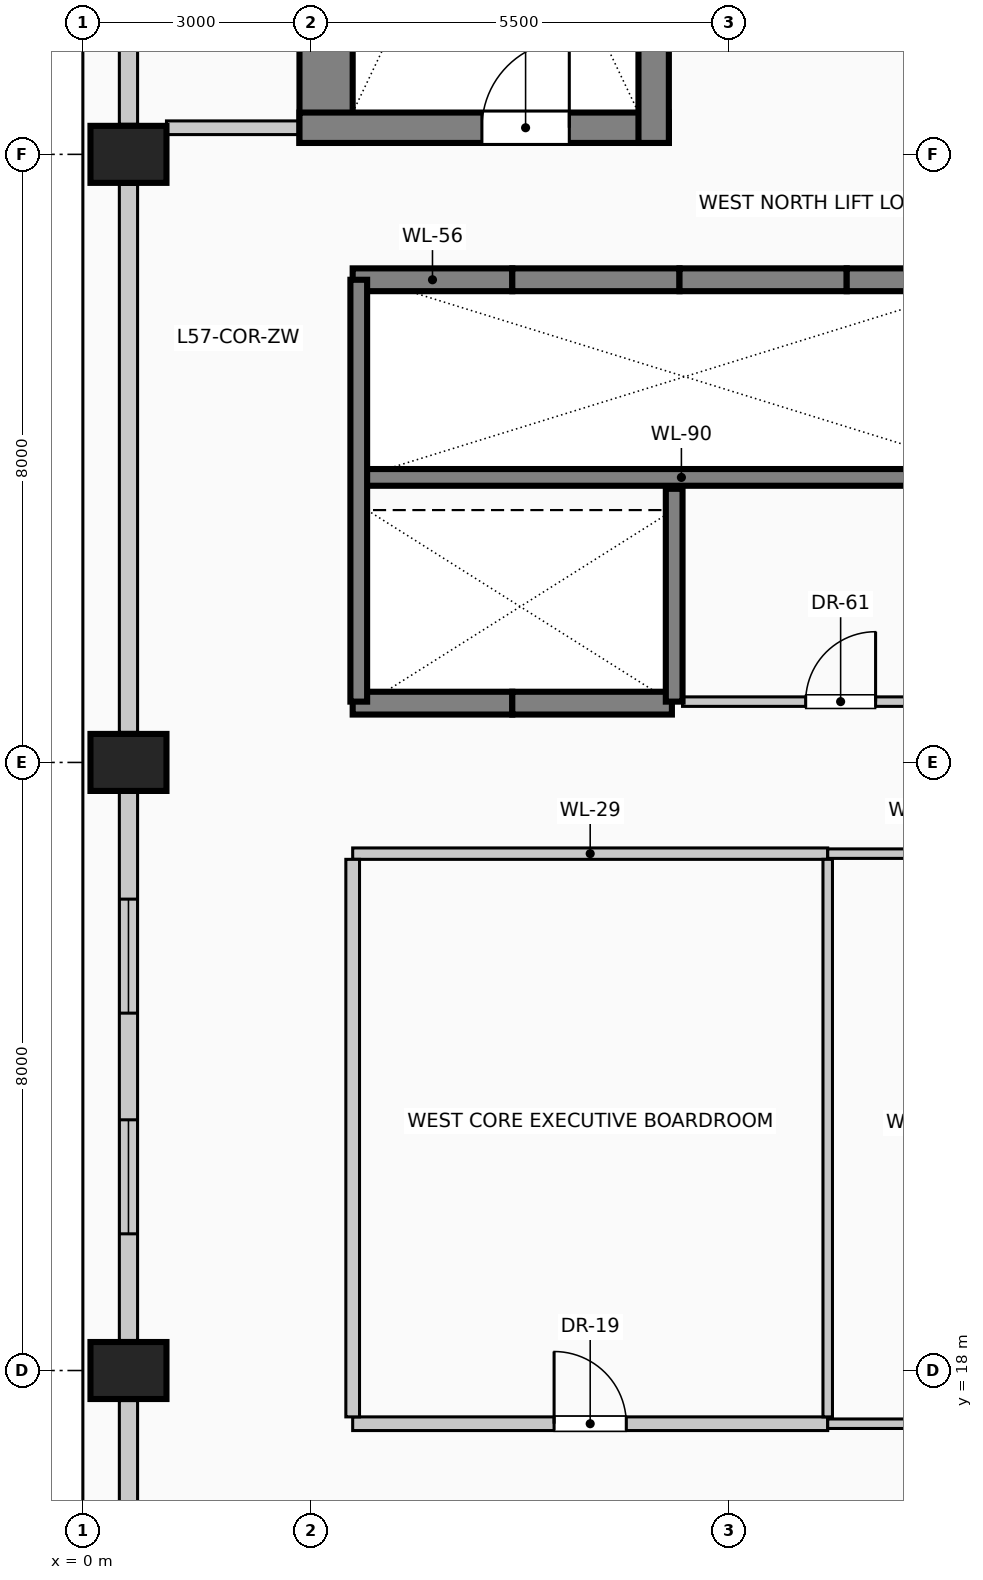
"""IFC4 building model, lengths in metres.
Left out: names, types, materials, properties, quantities, classifications, styles, units other than length and angle.
Written with IfcOpenShell. Run it as: python <this file> out.ifc"""

import sys

from ifc_helpers import new_model, si_unit, direction, frame, frame_2d, origin, origin_2d, place, context, subcontext, project, spatial, rectangle, extrude, element, fill, save


model = new_model("IFC4")
c1 = context("Model", 3, precision=1e-05, world=origin(), true_north=direction((0.0, 1.0)))
c2 = subcontext(c1, "Body", "Model", "MODEL_VIEW")
j1 = project(units=[si_unit("LENGTHUNIT", "METRE"), si_unit("PLANEANGLEUNIT", "RADIAN")], contexts=[c1])
p1 = place(None, origin())
s1 = spatial("IfcSite", under=j1, at=p1, CompositionType="ELEMENT")
p2 = place(p1, origin())
s2 = spatial("IfcBuilding", under=s1, at=p2, CompositionType="ELEMENT")
p3 = place(p2, frame((0.0, 0.0, 234.6)))
s3 = spatial("IfcBuildingStorey", under=s2, at=p3, CompositionType="ELEMENT", Elevation=234.6)
p4 = place(p3, frame((3.2, 34.15, 0.0), z_axis=(0.0, 0.0, 1.0), x_axis=(0.0, 1.0, 0.0)))
e1 = element("IfcWall", 1, at=p4, inside=s3, PredefinedType="SHEAR", context=c2, shape_type="SweptSolid", body=[
    extrude(rectangle(XDim=8.98, YDim=0.7, at=frame_2d((4.49, 0.0))), origin(), (0.0, 0.0, 1.0), 4.0),
])
p5 = place(p3, frame((2.85, 34.35, 0.0), z_axis=(0.0, 0.0, 1.0), x_axis=(1.0, 0.0, 0.0)))
e2 = element("IfcWall", 2, at=p5, inside=s3, PredefinedType="SHEAR", context=c2, shape_type="SweptSolid", body=[
    extrude(rectangle(XDim=4.86, YDim=0.4, at=frame_2d((2.43, 0.0))), origin(), (0.0, 0.0, 1.0), 4.0),
])
p6 = place(p5, frame((2.4, 0.0, 0.0)))
e3 = element("IfcOpeningElement", 3, at=p6, cuts=e2, PredefinedType="OPENING", context=c2, shape_type="SweptSolid", body=[
    extrude(rectangle(XDim=1.15, YDim=2.2, at=frame_2d((0.575, 1.1))), frame((0.0, 0.21, 0.0), z_axis=(0.0, -1.0, 0.0), x_axis=(1.0, 0.0, 0.0)), (0.0, 0.0, 1.0), 0.42),
])
p7 = place(p3, frame((7.51, 34.15, 0.0), z_axis=(0.0, 0.0, 1.0), x_axis=(0.0, 1.0, 0.0)))
e4 = element("IfcWall", 4, at=p7, inside=s3, PredefinedType="SHEAR", context=c2, shape_type="SweptSolid", body=[
    extrude(rectangle(XDim=8.98, YDim=0.4, at=frame_2d((4.49, 0.0))), origin(), (0.0, 0.0, 1.0), 4.0),
])
for number, where, z_axis, x_axis in (
    (5, (0.6, 18.0, 0.0), (0.0, 0.0, 1.0), (0.0, 1.0, 0.0)),
    (6, (0.6, 26.0, 0.0), (0.0, 0.0, 1.0), (0.0, 1.0, 0.0)),
    (7, (0.6, 34.0, 0.0), (0.0, 0.0, 1.0), (0.0, 1.0, 0.0)),
):
    element("IfcColumn", number, at=place(p3, frame(where, z_axis=z_axis, x_axis=x_axis)), inside=s3, PredefinedType="COLUMN", context=c2, shape_type="SweptSolid", body=[
        extrude(rectangle(XDim=0.75, YDim=1.0, at=origin_2d()), origin(), (0.0, 0.0, 1.0), 4.0),
    ])
p8 = place(p3, frame((0.6, 10.395, 0.0), z_axis=(0.0, 0.0, 1.0), x_axis=(0.0, 1.0, 0.0)))
e8 = element("IfcWall", 8, at=p8, inside=s3, PredefinedType="SOLIDWALL", context=c2, shape_type="SweptSolid", body=[
    extrude(rectangle(XDim=7.21, YDim=0.24, at=frame_2d((3.605, 0.0))), origin(), (0.0, 0.0, 1.0), 2.91),
])
p9 = place(p8, frame((1.403, 0.0, 0.42)))
e9 = element("IfcOpeningElement", 9, at=p9, cuts=e8, PredefinedType="OPENING", context=c2, shape_type="SweptSolid", body=[
    extrude(rectangle(XDim=1.5, YDim=2.2, at=frame_2d((0.75, 1.1))), frame((0.0, 0.13, 0.0), z_axis=(0.0, -1.0, 0.0), x_axis=(1.0, 0.0, 0.0)), (0.0, 0.0, 1.0), 0.26),
])
p10 = place(p3, frame((0.6, 18.395, 0.0), z_axis=(0.0, 0.0, 1.0), x_axis=(0.0, 1.0, 0.0)))
e10 = element("IfcWall", 10, at=p10, inside=s3, PredefinedType="SOLIDWALL", context=c2, shape_type="SweptSolid", body=[
    extrude(rectangle(XDim=7.21, YDim=0.24, at=frame_2d((3.605, 0.0))), origin(), (0.0, 0.0, 1.0), 2.91),
])
p11 = place(p10, frame((1.403, 0.0, 0.42)))
e11 = element("IfcOpeningElement", 11, at=p11, cuts=e10, PredefinedType="OPENING", context=c2, shape_type="SweptSolid", body=[
    extrude(rectangle(XDim=1.5, YDim=2.2, at=frame_2d((0.75, 1.1))), frame((0.0, 0.13, 0.0), z_axis=(0.0, -1.0, 0.0), x_axis=(1.0, 0.0, 0.0)), (0.0, 0.0, 1.0), 0.26),
])
p12 = place(p10, frame((4.307, 0.0, 0.42)))
e12 = element("IfcOpeningElement", 12, at=p12, cuts=e10, PredefinedType="OPENING", context=c2, shape_type="SweptSolid", body=[
    extrude(rectangle(XDim=1.5, YDim=2.2, at=frame_2d((0.75, 1.1))), frame((0.0, 0.13, 0.0), z_axis=(0.0, -1.0, 0.0), x_axis=(1.0, 0.0, 0.0)), (0.0, 0.0, 1.0), 0.26),
])
p13 = place(p3, frame((0.6, 26.395, 0.0), z_axis=(0.0, 0.0, 1.0), x_axis=(0.0, 1.0, 0.0)))
e13 = element("IfcWall", 13, at=p13, inside=s3, PredefinedType="SOLIDWALL", context=c2, shape_type="SweptSolid", body=[
    extrude(rectangle(XDim=7.21, YDim=0.24, at=frame_2d((3.605, 0.0))), origin(), (0.0, 0.0, 1.0), 2.91),
])
p14 = place(p3, frame((0.6, 34.395, 0.0), z_axis=(0.0, 0.0, 1.0), x_axis=(0.0, 1.0, 0.0)))
e14 = element("IfcWall", 14, at=p14, inside=s3, PredefinedType="SOLIDWALL", context=c2, shape_type="SweptSolid", body=[
    extrude(rectangle(XDim=7.61, YDim=0.24, at=frame_2d((3.805, 0.0))), origin(), (0.0, 0.0, 1.0), 2.91),
])
p15 = place(p3, frame((3.55, 32.35, 0.0), z_axis=(0.0, 0.0, 1.0), x_axis=(1.0, 0.0, 0.0)))
e15 = element("IfcWall", 15, at=p15, inside=s3, PredefinedType="SOLIDWALL", context=c2, shape_type="SweptSolid", body=[
    extrude(rectangle(XDim=2.1, YDim=0.3, at=frame_2d((1.05, 0.0))), origin(), (0.0, 0.0, 1.0), 4.0),
])
p16 = place(p3, frame((5.65, 32.35, 0.0), z_axis=(0.0, 0.0, 1.0), x_axis=(1.0, 0.0, 0.0)))
e16 = element("IfcWall", 16, at=p16, inside=s3, PredefinedType="SOLIDWALL", context=c2, shape_type="SweptSolid", body=[
    extrude(rectangle(XDim=2.2, YDim=0.3, at=frame_2d((1.1, 0.0))), origin(), (0.0, 0.0, 1.0), 4.0),
])
p17 = place(p3, frame((7.85, 32.35, 0.0), z_axis=(0.0, 0.0, 1.0), x_axis=(1.0, 0.0, 0.0)))
e17 = element("IfcWall", 17, at=p17, inside=s3, PredefinedType="SOLIDWALL", context=c2, shape_type="SweptSolid", body=[
    extrude(rectangle(XDim=2.2, YDim=0.3, at=frame_2d((1.1, 0.0))), origin(), (0.0, 0.0, 1.0), 4.0),
])
p18 = place(p3, frame((10.05, 32.35, 0.0), z_axis=(0.0, 0.0, 1.0), x_axis=(1.0, 0.0, 0.0)))
e18 = element("IfcWall", 18, at=p18, inside=s3, PredefinedType="SOLIDWALL", context=c2, shape_type="SweptSolid", body=[
    extrude(rectangle(XDim=2.15, YDim=0.3, at=frame_2d((1.075, 0.0))), origin(), (0.0, 0.0, 1.0), 4.0),
])
p19 = place(p3, frame((5.65, 26.78, 0.0), z_axis=(0.0, 0.0, 1.0), x_axis=(-1.0, 0.0, 0.0)))
e19 = element("IfcWall", 19, at=p19, inside=s3, PredefinedType="SOLIDWALL", context=c2, shape_type="SweptSolid", body=[
    extrude(rectangle(XDim=2.1, YDim=0.3, at=frame_2d((1.05, 0.0))), origin(), (0.0, 0.0, 1.0), 4.0),
])
p20 = place(p3, frame((7.75, 26.78, 0.0), z_axis=(0.0, 0.0, 1.0), x_axis=(-1.0, 0.0, 0.0)))
e20 = element("IfcWall", 20, at=p20, inside=s3, PredefinedType="SOLIDWALL", context=c2, shape_type="SweptSolid", body=[
    extrude(rectangle(XDim=2.1, YDim=0.3, at=frame_2d((1.05, 0.0))), origin(), (0.0, 0.0, 1.0), 4.0),
])
p21 = place(p3, frame((3.55, 29.75, 0.0), z_axis=(0.0, 0.0, 1.0), x_axis=(1.0, 0.0, 0.0)))
e21 = element("IfcWall", 21, at=p21, inside=s3, PredefinedType="SOLIDWALL", context=c2, shape_type="SweptSolid", body=[
    extrude(rectangle(XDim=8.65, YDim=0.22, at=frame_2d((4.325, 0.0))), origin(), (0.0, 0.0, 1.0), 4.0),
])
p22 = place(p3, frame((3.63, 26.8, 0.0), z_axis=(0.0, 0.0, 1.0), x_axis=(0.0, 1.0, 0.0)))
e22 = element("IfcWall", 22, at=p22, inside=s3, PredefinedType="SOLIDWALL", context=c2, shape_type="SweptSolid", body=[
    extrude(rectangle(XDim=5.55, YDim=0.22, at=frame_2d((2.775, 0.0))), origin(), (0.0, 0.0, 1.0), 4.0),
])
p23 = place(p3, frame((7.78, 26.8, 0.0), z_axis=(0.0, 0.0, 1.0), x_axis=(0.0, 1.0, 0.0)))
e23 = element("IfcWall", 23, at=p23, inside=s3, PredefinedType="SOLIDWALL", context=c2, shape_type="SweptSolid", body=[
    extrude(rectangle(XDim=2.8, YDim=0.22, at=frame_2d((1.4, 0.0))), origin(), (0.0, 0.0, 1.0), 4.0),
])
p24 = place(p3, frame((3.55, 17.3, 0.0), z_axis=(0.0, 0.0, 1.0), x_axis=(1.0, 0.0, 0.0)))
e24 = element("IfcWall", 24, at=p24, inside=s3, PredefinedType="PARTITIONING", context=c2, shape_type="SweptSolid", body=[
    extrude(rectangle(XDim=6.25, YDim=0.18, at=frame_2d((3.125, 0.0))), origin(), (0.0, 0.0, 1.0), 3.66),
])
p25 = place(p24, frame((2.65, 0.0, 0.0)))
e25 = element("IfcOpeningElement", 25, at=p25, cuts=e24, PredefinedType="OPENING", context=c2, shape_type="SweptSolid", body=[
    extrude(rectangle(XDim=0.95, YDim=2.15, at=frame_2d((0.475, 1.075))), frame((0.0, 0.1, 0.0), z_axis=(0.0, -1.0, 0.0), x_axis=(1.0, 0.0, 0.0)), (0.0, 0.0, 1.0), 0.2),
])
p26 = place(p3, frame((9.8, 17.3, 0.0), z_axis=(0.0, 0.0, 1.0), x_axis=(1.0, 0.0, 0.0)))
e26 = element("IfcWall", 26, at=p26, inside=s3, PredefinedType="PARTITIONING", context=c2, shape_type="SweptSolid", body=[
    extrude(rectangle(XDim=6.05, YDim=0.125, at=frame_2d((3.025, 0.0))), origin(), (0.0, 0.0, 1.0), 3.66),
])
p27 = place(p26, frame((2.575, 0.0, 0.0)))
e27 = element("IfcOpeningElement", 27, at=p27, cuts=e26, PredefinedType="OPENING", context=c2, shape_type="SweptSolid", body=[
    extrude(rectangle(XDim=0.9, YDim=2.1, at=frame_2d((0.45, 1.05))), frame((0.0, 0.073, 0.0), z_axis=(0.0, -1.0, 0.0), x_axis=(1.0, 0.0, 0.0)), (0.0, 0.0, 1.0), 0.145),
])
p28 = place(p3, frame((3.55, 24.8, 0.0), z_axis=(0.0, 0.0, 1.0), x_axis=(1.0, 0.0, 0.0)))
e28 = element("IfcWall", 28, at=p28, inside=s3, PredefinedType="PARTITIONING", context=c2, shape_type="SweptSolid", body=[
    extrude(rectangle(XDim=6.25, YDim=0.15, at=frame_2d((3.125, 0.0))), origin(), (0.0, 0.0, 1.0), 3.66),
])
p29 = place(p3, frame((9.8, 24.8, 0.0), z_axis=(0.0, 0.0, 1.0), x_axis=(1.0, 0.0, 0.0)))
e29 = element("IfcWall", 29, at=p29, inside=s3, PredefinedType="PARTITIONING", context=c2, shape_type="SweptSolid", body=[
    extrude(rectangle(XDim=2.4, YDim=0.125, at=frame_2d((1.2, 0.0))), origin(), (0.0, 0.0, 1.0), 3.66),
])
p30 = place(p3, frame((7.89, 26.8, 0.0), z_axis=(0.0, 0.0, 1.0), x_axis=(1.0, 0.0, 0.0)))
e30 = element("IfcWall", 30, at=p30, inside=s3, PredefinedType="PARTITIONING", context=c2, shape_type="SweptSolid", body=[
    extrude(rectangle(XDim=4.16, YDim=0.125, at=frame_2d((2.08, 0.0))), origin(), (0.0, 0.0, 1.0), 3.66),
])
p31 = place(p30, frame((1.62, 0.0, 0.0)))
e31 = element("IfcOpeningElement", 31, at=p31, cuts=e30, PredefinedType="OPENING", context=c2, shape_type="SweptSolid", body=[
    extrude(rectangle(XDim=0.92, YDim=2.1, at=frame_2d((0.46, 1.05))), frame((0.0, 0.073, 0.0), z_axis=(0.0, -1.0, 0.0), x_axis=(1.0, 0.0, 0.0)), (0.0, 0.0, 1.0), 0.145),
])
p32 = place(p3, frame((1.1, 34.35, 0.0), z_axis=(0.0, 0.0, 1.0), x_axis=(1.0, 0.0, 0.0)))
e32 = element("IfcWall", 32, at=p32, inside=s3, PredefinedType="PARTITIONING", context=c2, shape_type="SweptSolid", body=[
    extrude(rectangle(XDim=1.75, YDim=0.18, at=frame_2d((0.875, 0.0))), origin(), (0.0, 0.0, 1.0), 3.66),
])
p33 = place(p3, frame((3.55, 17.39, 0.0), z_axis=(0.0, 0.0, 1.0), x_axis=(0.0, 1.0, 0.0)))
e33 = element("IfcWall", 33, at=p33, inside=s3, PredefinedType="PARTITIONING", context=c2, shape_type="SweptSolid", body=[
    extrude(rectangle(XDim=7.335, YDim=0.18, at=frame_2d((3.667, 0.0))), origin(), (0.0, 0.0, 1.0), 3.66),
])
p34 = place(p3, frame((9.8, 17.39, 0.0), z_axis=(0.0, 0.0, 1.0), x_axis=(0.0, 1.0, 0.0)))
e34 = element("IfcWall", 34, at=p34, inside=s3, PredefinedType="PARTITIONING", context=c2, shape_type="SweptSolid", body=[
    extrude(rectangle(XDim=7.335, YDim=0.125, at=frame_2d((3.667, 0.0))), origin(), (0.0, 0.0, 1.0), 3.66),
])
p35 = place(p11, origin())
e35 = element("IfcWindow", 35, at=p35, inside=s3, PartitioningType="SINGLE_PANEL", PredefinedType="WINDOW", context=c2, shape_type="SweptSolid", body=[
    extrude(rectangle(XDim=1.5, YDim=2.2, at=frame_2d((0.75, 1.1))), frame((0.0, 0.03, 0.0), z_axis=(0.0, -1.0, 0.0), x_axis=(1.0, 0.0, 0.0)), (0.0, 0.0, 1.0), 0.06),
])
fill(e11, e35)
p36 = place(p12, origin())
e36 = element("IfcWindow", 36, at=p36, inside=s3, PartitioningType="SINGLE_PANEL", PredefinedType="WINDOW", context=c2, shape_type="SweptSolid", body=[
    extrude(rectangle(XDim=1.5, YDim=2.2, at=frame_2d((0.75, 1.1))), frame((0.0, 0.03, 0.0), z_axis=(0.0, -1.0, 0.0), x_axis=(1.0, 0.0, 0.0)), (0.0, 0.0, 1.0), 0.06),
])
fill(e12, e36)
p37 = place(p6, origin())
e37 = element("IfcDoor", 37, at=p37, inside=s3, OperationType="SINGLE_SWING_RIGHT", PredefinedType="DOOR", context=c2, shape_type="SweptSolid", body=[
    extrude(rectangle(XDim=1.15, YDim=2.2, at=frame_2d((0.575, 1.1))), frame((0.0, 0.025, 0.0), z_axis=(0.0, -1.0, 0.0), x_axis=(1.0, 0.0, 0.0)), (0.0, 0.0, 1.0), 0.05),
])
fill(e3, e37)
p38 = place(p25, origin())
e38 = element("IfcDoor", 38, at=p38, inside=s3, OperationType="SINGLE_SWING_LEFT", PredefinedType="DOOR", context=c2, shape_type="SweptSolid", body=[
    extrude(rectangle(XDim=0.95, YDim=2.15, at=frame_2d((0.475, 1.075))), frame((0.0, 0.025, 0.0), z_axis=(0.0, -1.0, 0.0), x_axis=(1.0, 0.0, 0.0)), (0.0, 0.0, 1.0), 0.05),
])
fill(e25, e38)
p39 = place(p31, origin())
e39 = element("IfcDoor", 39, at=p39, inside=s3, OperationType="SINGLE_SWING_RIGHT", PredefinedType="DOOR", context=c2, shape_type="SweptSolid", body=[
    extrude(rectangle(XDim=0.92, YDim=2.1, at=frame_2d((0.46, 1.05))), frame((0.0, 0.025, 0.0), z_axis=(0.0, -1.0, 0.0), x_axis=(1.0, 0.0, 0.0)), (0.0, 0.0, 1.0), 0.05),
])
fill(e31, e39)
save(model, sys.argv[1])
